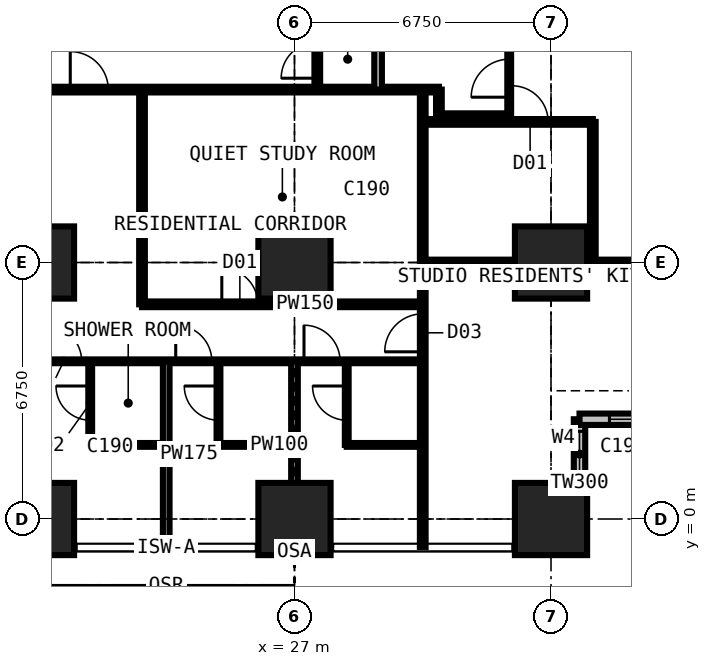
"""IFC4 building model, lengths in metres.
Left out: names, types, materials, properties, quantities, classifications, styles, units other than length and angle.
Written with IfcOpenShell. Run it as: python <this file> out.ifc"""

import sys

from ifc_helpers import new_model, si_unit, direction, frame, frame_2d, origin, origin_2d, place, context, subcontext, project, spatial, rectangle, extrude, element, fill, save


model = new_model("IFC4")
c1 = context("Model", 3, precision=1e-05, world=origin(), true_north=direction((0.0, 1.0)))
c2 = subcontext(c1, "Body", "Model", "MODEL_VIEW")
j1 = project(units=[si_unit("LENGTHUNIT", "METRE"), si_unit("PLANEANGLEUNIT", "RADIAN")], contexts=[c1])
p1 = place(None, origin())
s1 = spatial("IfcSite", under=j1, at=p1, CompositionType="ELEMENT")
p2 = place(p1, origin())
s2 = spatial("IfcBuilding", under=s1, at=p2, CompositionType="ELEMENT")
p3 = place(p2, frame((0.0, 0.0, 39.6)))
s3 = spatial("IfcBuildingStorey", under=s2, at=p3, CompositionType="ELEMENT", Elevation=39.6)
for number, where, z_axis, x_axis in (
    (1, (20.25, 0.0, 0.0), (0.0, 0.0, 1.0), (1.0, 0.0, 0.0)),
    (2, (20.25, 6.75, 0.0), (0.0, 0.0, 1.0), (1.0, 0.0, 0.0)),
    (3, (27.0, 0.0, 0.0), (0.0, 0.0, 1.0), (1.0, 0.0, 0.0)),
    (4, (27.0, 6.75, 0.0), (0.0, 0.0, 1.0), (1.0, 0.0, 0.0)),
    (5, (33.75, 0.0, 0.0), (0.0, 0.0, 1.0), (1.0, 0.0, 0.0)),
    (6, (33.75, 6.75, 0.0), (0.0, 0.0, 1.0), (1.0, 0.0, 0.0)),
):
    element("IfcColumn", number, at=place(p3, frame(where, z_axis=z_axis, x_axis=x_axis)), inside=s3, PredefinedType="COLUMN", context=c2, shape_type="SweptSolid", body=[
        extrude(rectangle(XDim=1.9, YDim=1.9, at=origin_2d()), origin(), (0.0, 0.0, 1.0), 3.6),
    ])
p4 = place(p3, frame((34.5, -0.75, 0.0), z_axis=(0.0, 0.0, 1.0), x_axis=(0.0, 1.0, 0.0)))
e7 = element("IfcWall", 7, at=p4, inside=s3, PredefinedType="SOLIDWALL", context=c2, shape_type="SweptSolid", body=[
    extrude(rectangle(XDim=3.375, YDim=0.3, at=frame_2d((1.688, 0.0))), origin(), (0.0, 0.0, 1.0), 3.375),
])
p5 = place(p4, frame((1.857, 0.0, 0.9)))
e8 = element("IfcOpeningElement", 8, at=p5, cuts=e7, PredefinedType="OPENING", context=c2, shape_type="SweptSolid", body=[
    extrude(rectangle(XDim=1.2, YDim=1.8, at=frame_2d((0.6, 0.9))), frame((0.0, 0.16, 0.0), z_axis=(0.0, -1.0, 0.0), x_axis=(1.0, 0.0, 0.0)), (0.0, 0.0, 1.0), 0.32),
])
p6 = place(p3, frame((34.5, 2.625, 0.0), z_axis=(0.0, 0.0, 1.0), x_axis=(1.0, 0.0, 0.0)))
e9 = element("IfcWall", 9, at=p6, inside=s3, PredefinedType="SOLIDWALL", context=c2, shape_type="SweptSolid", body=[
    extrude(rectangle(XDim=3.375, YDim=0.3, at=frame_2d((1.688, 0.0))), origin(), (0.0, 0.0, 1.0), 3.375),
])
p7 = place(p6, frame((0.788, 0.0, 0.6)))
e10 = element("IfcOpeningElement", 10, at=p7, cuts=e9, PredefinedType="OPENING", context=c2, shape_type="SweptSolid", body=[
    extrude(rectangle(XDim=1.8, YDim=2.1, at=frame_2d((0.9, 1.05))), frame((0.0, 0.16, 0.0), z_axis=(0.0, -1.0, 0.0), x_axis=(1.0, 0.0, 0.0)), (0.0, 0.0, 1.0), 0.32),
])
p8 = place(p3, frame((6.75, 4.15, 0.0), z_axis=(0.0, 0.0, 1.0), x_axis=(1.0, 0.0, 0.0)))
e11 = element("IfcWall", 11, at=p8, inside=s3, PredefinedType="PARTITIONING", context=c2, shape_type="SweptSolid", body=[
    extrude(rectangle(XDim=23.625, YDim=0.1, at=frame_2d((11.812, 0.0))), origin(), (0.0, 0.0, 1.0), 3.375),
])
p9 = place(p8, frame((1.2, 0.0, 0.0)))
e12 = element("IfcOpeningElement", 12, at=p9, cuts=e11, PredefinedType="OPENING", context=c2, shape_type="SweptSolid", body=[
    extrude(rectangle(XDim=1.0, YDim=2.2, at=frame_2d((0.5, 1.1))), frame((0.0, 0.06, 0.0), z_axis=(0.0, -1.0, 0.0), x_axis=(1.0, 0.0, 0.0)), (0.0, 0.0, 1.0), 0.12),
])
p10 = place(p8, frame((3.575, 0.0, 0.0)))
e13 = element("IfcOpeningElement", 13, at=p10, cuts=e11, PredefinedType="OPENING", context=c2, shape_type="SweptSolid", body=[
    extrude(rectangle(XDim=0.95, YDim=2.2, at=frame_2d((0.475, 1.1))), frame((0.0, 0.06, 0.0), z_axis=(0.0, -1.0, 0.0), x_axis=(1.0, 0.0, 0.0)), (0.0, 0.0, 1.0), 0.12),
])
p11 = place(p8, frame((7.0, 0.0, 0.0)))
e14 = element("IfcOpeningElement", 14, at=p11, cuts=e11, PredefinedType="OPENING", context=c2, shape_type="SweptSolid", body=[
    extrude(rectangle(XDim=0.95, YDim=2.2, at=frame_2d((0.475, 1.1))), frame((0.0, 0.06, 0.0), z_axis=(0.0, -1.0, 0.0), x_axis=(1.0, 0.0, 0.0)), (0.0, 0.0, 1.0), 0.12),
])
p12 = place(p8, frame((10.375, 0.0, 0.0)))
e15 = element("IfcOpeningElement", 15, at=p12, cuts=e11, PredefinedType="OPENING", context=c2, shape_type="SweptSolid", body=[
    extrude(rectangle(XDim=0.95, YDim=2.2, at=frame_2d((0.475, 1.1))), frame((0.0, 0.06, 0.0), z_axis=(0.0, -1.0, 0.0), x_axis=(1.0, 0.0, 0.0)), (0.0, 0.0, 1.0), 0.12),
])
p13 = place(p8, frame((13.7, 0.0, 0.0)))
e16 = element("IfcOpeningElement", 16, at=p13, cuts=e11, PredefinedType="OPENING", context=c2, shape_type="SweptSolid", body=[
    extrude(rectangle(XDim=0.95, YDim=2.2, at=frame_2d((0.475, 1.1))), frame((0.0, 0.06, 0.0), z_axis=(0.0, -1.0, 0.0), x_axis=(1.0, 0.0, 0.0)), (0.0, 0.0, 1.0), 0.12),
])
p14 = place(p8, frame((17.125, 0.0, 0.0)))
e17 = element("IfcOpeningElement", 17, at=p14, cuts=e11, PredefinedType="OPENING", context=c2, shape_type="SweptSolid", body=[
    extrude(rectangle(XDim=0.95, YDim=2.2, at=frame_2d((0.475, 1.1))), frame((0.0, 0.06, 0.0), z_axis=(0.0, -1.0, 0.0), x_axis=(1.0, 0.0, 0.0)), (0.0, 0.0, 1.0), 0.12),
])
p15 = place(p8, frame((20.5, 0.0, 0.0)))
e18 = element("IfcOpeningElement", 18, at=p15, cuts=e11, PredefinedType="OPENING", context=c2, shape_type="SweptSolid", body=[
    extrude(rectangle(XDim=0.95, YDim=2.2, at=frame_2d((0.475, 1.1))), frame((0.0, 0.06, 0.0), z_axis=(0.0, -1.0, 0.0), x_axis=(1.0, 0.0, 0.0)), (0.0, 0.0, 1.0), 0.12),
])
p16 = place(p3, frame((10.125, 11.3, 0.0), z_axis=(0.0, 0.0, 1.0), x_axis=(1.0, 0.0, 0.0)))
e19 = element("IfcWall", 19, at=p16, inside=s3, PredefinedType="PARTITIONING", context=c2, shape_type="SweptSolid", body=[
    extrude(rectangle(XDim=20.675, YDim=0.15, at=frame_2d((10.337, 0.0))), origin(), (0.0, 0.0, 1.0), 3.375),
])
p17 = place(p16, frame((8.375, 0.0, 0.0)))
e20 = element("IfcOpeningElement", 20, at=p17, cuts=e19, PredefinedType="OPENING", context=c2, shape_type="SweptSolid", body=[
    extrude(rectangle(XDim=1.0, YDim=2.2, at=frame_2d((0.5, 1.1))), frame((0.0, 0.085, 0.0), z_axis=(0.0, -1.0, 0.0), x_axis=(1.0, 0.0, 0.0)), (0.0, 0.0, 1.0), 0.17),
])
p18 = place(p16, frame((10.975, 0.0, 0.0)))
e21 = element("IfcOpeningElement", 21, at=p18, cuts=e19, PredefinedType="OPENING", context=c2, shape_type="SweptSolid", body=[
    extrude(rectangle(XDim=1.0, YDim=2.2, at=frame_2d((0.5, 1.1))), frame((0.0, 0.085, 0.0), z_axis=(0.0, -1.0, 0.0), x_axis=(1.0, 0.0, 0.0)), (0.0, 0.0, 1.0), 0.17),
])
p19 = place(p16, frame((3.925, 0.0, 0.0)))
e22 = element("IfcOpeningElement", 22, at=p19, cuts=e19, PredefinedType="OPENING", context=c2, shape_type="SweptSolid", body=[
    extrude(rectangle(XDim=0.95, YDim=2.2, at=frame_2d((0.475, 1.1))), frame((0.0, 0.085, 0.0), z_axis=(0.0, -1.0, 0.0), x_axis=(1.0, 0.0, 0.0)), (0.0, 0.0, 1.0), 0.17),
])
p20 = place(p3, frame((21.625, 1.95, 0.0), z_axis=(0.0, 0.0, 1.0), x_axis=(0.0, 1.0, 0.0)))
e23 = element("IfcWall", 23, at=p20, inside=s3, PredefinedType="PARTITIONING", context=c2, shape_type="SweptSolid", body=[
    extrude(rectangle(XDim=2.2, YDim=0.1, at=frame_2d((1.1, 0.0))), origin(), (0.0, 0.0, 1.0), 3.375),
])
p21 = place(p20, frame((0.65, 0.0, 0.0)))
e24 = element("IfcOpeningElement", 24, at=p21, cuts=e23, PredefinedType="OPENING", context=c2, shape_type="SweptSolid", body=[
    extrude(rectangle(XDim=0.9, YDim=2.2, at=frame_2d((0.45, 1.1))), frame((0.0, 0.06, 0.0), z_axis=(0.0, -1.0, 0.0), x_axis=(1.0, 0.0, 0.0)), (0.0, 0.0, 1.0), 0.12),
])
p22 = place(p3, frame((21.625, 1.95, 0.0), z_axis=(0.0, 0.0, 1.0), x_axis=(1.0, 0.0, 0.0)))
e25 = element("IfcWall", 25, at=p22, inside=s3, PredefinedType="PARTITIONING", context=c2, shape_type="SweptSolid", body=[
    extrude(rectangle(XDim=2.0, YDim=0.1, at=frame_2d((1.0, 0.0))), origin(), (0.0, 0.0, 1.0), 3.375),
])
p23 = place(p3, frame((22.988, 5.65, 0.0), z_axis=(0.0, 0.0, 1.0), x_axis=(1.0, 0.0, 0.0)))
e26 = element("IfcWall", 26, at=p23, inside=s3, PredefinedType="PARTITIONING", context=c2, shape_type="SweptSolid", body=[
    extrude(rectangle(XDim=7.387, YDim=0.15, at=frame_2d((3.694, 0.0))), origin(), (0.0, 0.0, 1.0), 3.375),
])
p24 = place(p23, frame((2.1, 0.0, 0.0)))
e27 = element("IfcOpeningElement", 27, at=p24, cuts=e26, PredefinedType="OPENING", context=c2, shape_type="SweptSolid", body=[
    extrude(rectangle(XDim=0.95, YDim=2.2, at=frame_2d((0.475, 1.1))), frame((0.0, 0.085, 0.0), z_axis=(0.0, -1.0, 0.0), x_axis=(1.0, 0.0, 0.0)), (0.0, 0.0, 1.0), 0.17),
])
p25 = place(p3, frame((22.988, 5.65, 0.0), z_axis=(0.0, 0.0, 1.0), x_axis=(0.0, 1.0, 0.0)))
e28 = element("IfcWall", 28, at=p25, inside=s3, PredefinedType="PARTITIONING", context=c2, shape_type="SweptSolid", body=[
    extrude(rectangle(XDim=5.65, YDim=0.15, at=frame_2d((2.825, 0.0))), origin(), (0.0, 0.0, 1.0), 3.375),
])
p26 = place(p3, frame((23.625, -0.734, 0.0), z_axis=(0.0, 0.0, 1.0), x_axis=(0.0, 1.0, 0.0)))
e29 = element("IfcWall", 29, at=p26, inside=s3, PredefinedType="PARTITIONING", context=c2, shape_type="SweptSolid", body=[
    extrude(rectangle(XDim=4.884, YDim=0.175, at=frame_2d((2.442, 0.0))), origin(), (0.0, 0.0, 1.0), 3.375),
])
p27 = place(p3, frame((25.0, 1.95, 0.0), z_axis=(0.0, 0.0, 1.0), x_axis=(0.0, 1.0, 0.0)))
e30 = element("IfcWall", 30, at=p27, inside=s3, PredefinedType="PARTITIONING", context=c2, shape_type="SweptSolid", body=[
    extrude(rectangle(XDim=2.2, YDim=0.1, at=frame_2d((1.1, 0.0))), origin(), (0.0, 0.0, 1.0), 3.375),
])
p28 = place(p27, frame((0.65, 0.0, 0.0)))
e31 = element("IfcOpeningElement", 31, at=p28, cuts=e30, PredefinedType="OPENING", context=c2, shape_type="SweptSolid", body=[
    extrude(rectangle(XDim=0.9, YDim=2.2, at=frame_2d((0.45, 1.1))), frame((0.0, 0.06, 0.0), z_axis=(0.0, -1.0, 0.0), x_axis=(1.0, 0.0, 0.0)), (0.0, 0.0, 1.0), 0.12),
])
p29 = place(p3, frame((25.0, 1.95, 0.0), z_axis=(0.0, 0.0, 1.0), x_axis=(1.0, 0.0, 0.0)))
e32 = element("IfcWall", 32, at=p29, inside=s3, PredefinedType="PARTITIONING", context=c2, shape_type="SweptSolid", body=[
    extrude(rectangle(XDim=2.0, YDim=0.1, at=frame_2d((1.0, 0.0))), origin(), (0.0, 0.0, 1.0), 3.375),
])
p30 = place(p3, frame((27.0, -0.734, 0.0), z_axis=(0.0, 0.0, 1.0), x_axis=(0.0, 1.0, 0.0)))
e33 = element("IfcWall", 33, at=p30, inside=s3, PredefinedType="PARTITIONING", context=c2, shape_type="SweptSolid", body=[
    extrude(rectangle(XDim=4.884, YDim=0.175, at=frame_2d((2.442, 0.0))), origin(), (0.0, 0.0, 1.0), 2.61),
])
p31 = place(p3, frame((27.6, 11.3, 0.0), z_axis=(0.0, 0.0, 1.0), x_axis=(0.0, 1.0, 0.0)))
e34 = element("IfcWall", 34, at=p31, inside=s3, PredefinedType="PARTITIONING", context=c2, shape_type="SweptSolid", body=[
    extrude(rectangle(XDim=1.6, YDim=0.15, at=frame_2d((0.8, 0.0))), origin(), (0.0, 0.0, 1.0), 3.375),
])
p32 = place(p31, frame((0.3, 0.0, 0.0)))
e35 = element("IfcOpeningElement", 35, at=p32, cuts=e34, PredefinedType="OPENING", context=c2, shape_type="SweptSolid", body=[
    extrude(rectangle(XDim=0.95, YDim=2.2, at=frame_2d((0.475, 1.1))), frame((0.0, 0.085, 0.0), z_axis=(0.0, -1.0, 0.0), x_axis=(1.0, 0.0, 0.0)), (0.0, 0.0, 1.0), 0.17),
])
p33 = place(p3, frame((28.375, 1.95, 0.0), z_axis=(0.0, 0.0, 1.0), x_axis=(0.0, 1.0, 0.0)))
e36 = element("IfcWall", 36, at=p33, inside=s3, PredefinedType="PARTITIONING", context=c2, shape_type="SweptSolid", body=[
    extrude(rectangle(XDim=2.2, YDim=0.1, at=frame_2d((1.1, 0.0))), origin(), (0.0, 0.0, 1.0), 3.375),
])
p34 = place(p33, frame((0.65, 0.0, 0.0)))
e37 = element("IfcOpeningElement", 37, at=p34, cuts=e36, PredefinedType="OPENING", context=c2, shape_type="SweptSolid", body=[
    extrude(rectangle(XDim=0.9, YDim=2.2, at=frame_2d((0.45, 1.1))), frame((0.0, 0.06, 0.0), z_axis=(0.0, -1.0, 0.0), x_axis=(1.0, 0.0, 0.0)), (0.0, 0.0, 1.0), 0.12),
])
p35 = place(p3, frame((28.375, 1.95, 0.0), z_axis=(0.0, 0.0, 1.0), x_axis=(1.0, 0.0, 0.0)))
e38 = element("IfcWall", 38, at=p35, inside=s3, PredefinedType="PARTITIONING", context=c2, shape_type="SweptSolid", body=[
    extrude(rectangle(XDim=2.0, YDim=0.1, at=frame_2d((1.0, 0.0))), origin(), (0.0, 0.0, 1.0), 3.375),
])
p36 = place(p3, frame((29.2, 11.3, 0.0), z_axis=(0.0, 0.0, 1.0), x_axis=(0.0, 1.0, 0.0)))
e39 = element("IfcWall", 39, at=p36, inside=s3, PredefinedType="PARTITIONING", context=c2, shape_type="SweptSolid", body=[
    extrude(rectangle(XDim=17.9, YDim=0.2, at=frame_2d((8.95, 0.0))), origin(), (0.0, 0.0, 1.0), 3.375),
])
p37 = place(p36, frame((8.35, 0.0, 0.0)))
e40 = element("IfcOpeningElement", 40, at=p37, cuts=e39, PredefinedType="OPENING", context=c2, shape_type="SweptSolid", body=[
    extrude(rectangle(XDim=1.2, YDim=2.2, at=frame_2d((0.6, 1.1))), frame((0.0, 0.11, 0.0), z_axis=(0.0, -1.0, 0.0), x_axis=(1.0, 0.0, 0.0)), (0.0, 0.0, 1.0), 0.22),
])
p38 = place(p3, frame((30.375, -0.734, 0.0), z_axis=(0.0, 0.0, 1.0), x_axis=(0.0, 1.0, 0.0)))
e41 = element("IfcWall", 41, at=p38, inside=s3, PredefinedType="PARTITIONING", context=c2, shape_type="SweptSolid", body=[
    extrude(rectangle(XDim=12.034, YDim=0.15, at=frame_2d((6.017, 0.0))), origin(), (0.0, 0.0, 1.0), 3.375),
])
p39 = place(p38, frame((5.134, 0.0, 0.0)))
e42 = element("IfcOpeningElement", 42, at=p39, cuts=e41, PredefinedType="OPENING", context=c2, shape_type="SweptSolid", body=[
    extrude(rectangle(XDim=1.0, YDim=2.2, at=frame_2d((0.5, 1.1))), frame((0.0, 0.085, 0.0), z_axis=(0.0, -1.0, 0.0), x_axis=(1.0, 0.0, 0.0)), (0.0, 0.0, 1.0), 0.17),
])
p40 = place(p3, frame((30.375, 6.75, 0.0), z_axis=(0.0, 0.0, 1.0), x_axis=(1.0, 0.0, 0.0)))
e43 = element("IfcWall", 43, at=p40, inside=s3, PredefinedType="PARTITIONING", context=c2, shape_type="SweptSolid", body=[
    extrude(rectangle(XDim=5.975, YDim=0.15, at=frame_2d((2.988, 0.0))), origin(), (0.0, 0.0, 1.0), 2.877),
])
p41 = place(p3, frame((30.375, 10.45, 0.0), z_axis=(0.0, 0.0, 1.0), x_axis=(1.0, 0.0, 0.0)))
e44 = element("IfcWall", 44, at=p41, inside=s3, PredefinedType="PARTITIONING", context=c2, shape_type="SweptSolid", body=[
    extrude(rectangle(XDim=4.475, YDim=0.15, at=frame_2d((2.238, 0.0))), origin(), (0.0, 0.0, 1.0), 3.375),
])
p42 = place(p41, frame((2.35, 0.0, 0.0)))
e45 = element("IfcOpeningElement", 45, at=p42, cuts=e44, PredefinedType="OPENING", context=c2, shape_type="SweptSolid", body=[
    extrude(rectangle(XDim=0.95, YDim=2.2, at=frame_2d((0.475, 1.1))), frame((0.0, 0.085, 0.0), z_axis=(0.0, -1.0, 0.0), x_axis=(1.0, 0.0, 0.0)), (0.0, 0.0, 1.0), 0.17),
])
p43 = place(p3, frame((30.8, 10.6, 0.0), z_axis=(0.0, 0.0, 1.0), x_axis=(0.0, 1.0, 0.0)))
e46 = element("IfcWall", 46, at=p43, inside=s3, PredefinedType="PARTITIONING", context=c2, shape_type="SweptSolid", body=[
    extrude(rectangle(XDim=0.7, YDim=0.15, at=frame_2d((0.35, 0.0))), origin(), (0.0, 0.0, 1.0), 3.375),
])
p44 = place(p3, frame((30.8, 10.6, 0.0), z_axis=(0.0, 0.0, 1.0), x_axis=(1.0, 0.0, 0.0)))
e47 = element("IfcWall", 47, at=p44, inside=s3, PredefinedType="PARTITIONING", context=c2, shape_type="SweptSolid", body=[
    extrude(rectangle(XDim=1.85, YDim=0.15, at=frame_2d((0.925, 0.0))), origin(), (0.0, 0.0, 1.0), 3.375),
])
p45 = place(p3, frame((32.65, 10.6, 0.0), z_axis=(0.0, 0.0, 1.0), x_axis=(0.0, 1.0, 0.0)))
e48 = element("IfcWall", 48, at=p45, inside=s3, PredefinedType="SHEAR", context=c2, shape_type="SweptSolid", body=[
    extrude(rectangle(XDim=9.3, YDim=0.1, at=frame_2d((4.65, 0.0))), origin(), (0.0, 0.0, 1.0), 3.375),
])
p46 = place(p45, frame((0.5, 0.0, 0.0)))
e49 = element("IfcOpeningElement", 49, at=p46, cuts=e48, PredefinedType="OPENING", context=c2, shape_type="SweptSolid", body=[
    extrude(rectangle(XDim=1.0, YDim=2.2, at=frame_2d((0.5, 1.1))), frame((0.0, 0.06, 0.0), z_axis=(0.0, -1.0, 0.0), x_axis=(1.0, 0.0, 0.0)), (0.0, 0.0, 1.0), 0.12),
])
p47 = place(p3, frame((34.85, 6.75, 0.0), z_axis=(0.0, 0.0, 1.0), x_axis=(0.0, 1.0, 0.0)))
e50 = element("IfcWall", 50, at=p47, inside=s3, PredefinedType="PARTITIONING", context=c2, shape_type="SweptSolid", body=[
    extrude(rectangle(XDim=3.7, YDim=0.15, at=frame_2d((1.85, 0.0))), origin(), (0.0, 0.0, 1.0), 3.375),
])
p48 = place(p5, origin())
e51 = element("IfcWindow", 51, at=p48, inside=s3, PartitioningType="SINGLE_PANEL", PredefinedType="WINDOW", context=c2, shape_type="SweptSolid", body=[
    extrude(rectangle(XDim=1.2, YDim=1.8, at=frame_2d((0.6, 0.9))), frame((0.0, 0.03, 0.0), z_axis=(0.0, -1.0, 0.0), x_axis=(1.0, 0.0, 0.0)), (0.0, 0.0, 1.0), 0.06),
])
fill(e8, e51)
p49 = place(p7, origin())
e52 = element("IfcWindow", 52, at=p49, inside=s3, PartitioningType="SINGLE_PANEL", PredefinedType="WINDOW", context=c2, shape_type="SweptSolid", body=[
    extrude(rectangle(XDim=1.8, YDim=2.1, at=frame_2d((0.9, 1.05))), frame((0.0, 0.03, 0.0), z_axis=(0.0, -1.0, 0.0), x_axis=(1.0, 0.0, 0.0)), (0.0, 0.0, 1.0), 0.06),
])
fill(e10, e52)
p50 = place(p32, origin())
e53 = element("IfcDoor", 53, at=p50, inside=s3, OperationType="SINGLE_SWING_LEFT", PredefinedType="DOOR", context=c2, shape_type="SweptSolid", body=[
    extrude(rectangle(XDim=0.95, YDim=2.2, at=frame_2d((0.475, 1.1))), frame((0.0, 0.025, 0.0), z_axis=(0.0, -1.0, 0.0), x_axis=(1.0, 0.0, 0.0)), (0.0, 0.0, 1.0), 0.05),
])
fill(e35, e53)
p51 = place(p13, origin())
e54 = element("IfcDoor", 54, at=p51, inside=s3, OperationType="SINGLE_SWING_LEFT", PredefinedType="DOOR", context=c2, shape_type="SweptSolid", body=[
    extrude(rectangle(XDim=0.95, YDim=2.2, at=frame_2d((0.475, 1.1))), frame((0.0, 0.025, 0.0), z_axis=(0.0, -1.0, 0.0), x_axis=(1.0, 0.0, 0.0)), (0.0, 0.0, 1.0), 0.05),
])
fill(e16, e54)
p52 = place(p21, origin())
e55 = element("IfcDoor", 55, at=p52, inside=s3, OperationType="SINGLE_SWING_RIGHT", PredefinedType="DOOR", context=c2, shape_type="SweptSolid", body=[
    extrude(rectangle(XDim=0.9, YDim=2.2, at=frame_2d((0.45, 1.1))), frame((0.0, 0.025, 0.0), z_axis=(0.0, -1.0, 0.0), x_axis=(1.0, 0.0, 0.0)), (0.0, 0.0, 1.0), 0.05),
])
fill(e24, e55)
p53 = place(p14, origin())
e56 = element("IfcDoor", 56, at=p53, inside=s3, OperationType="SINGLE_SWING_LEFT", PredefinedType="DOOR", context=c2, shape_type="SweptSolid", body=[
    extrude(rectangle(XDim=0.95, YDim=2.2, at=frame_2d((0.475, 1.1))), frame((0.0, 0.025, 0.0), z_axis=(0.0, -1.0, 0.0), x_axis=(1.0, 0.0, 0.0)), (0.0, 0.0, 1.0), 0.05),
])
fill(e17, e56)
p54 = place(p28, origin())
e57 = element("IfcDoor", 57, at=p54, inside=s3, OperationType="SINGLE_SWING_RIGHT", PredefinedType="DOOR", context=c2, shape_type="SweptSolid", body=[
    extrude(rectangle(XDim=0.9, YDim=2.2, at=frame_2d((0.45, 1.1))), frame((0.0, 0.025, 0.0), z_axis=(0.0, -1.0, 0.0), x_axis=(1.0, 0.0, 0.0)), (0.0, 0.0, 1.0), 0.05),
])
fill(e31, e57)
p55 = place(p15, origin())
e58 = element("IfcDoor", 58, at=p55, inside=s3, OperationType="SINGLE_SWING_LEFT", PredefinedType="DOOR", context=c2, shape_type="SweptSolid", body=[
    extrude(rectangle(XDim=0.95, YDim=2.2, at=frame_2d((0.475, 1.1))), frame((0.0, 0.025, 0.0), z_axis=(0.0, -1.0, 0.0), x_axis=(1.0, 0.0, 0.0)), (0.0, 0.0, 1.0), 0.05),
])
fill(e18, e58)
p56 = place(p34, origin())
e59 = element("IfcDoor", 59, at=p56, inside=s3, OperationType="SINGLE_SWING_RIGHT", PredefinedType="DOOR", context=c2, shape_type="SweptSolid", body=[
    extrude(rectangle(XDim=0.9, YDim=2.2, at=frame_2d((0.45, 1.1))), frame((0.0, 0.025, 0.0), z_axis=(0.0, -1.0, 0.0), x_axis=(1.0, 0.0, 0.0)), (0.0, 0.0, 1.0), 0.05),
])
fill(e37, e59)
p57 = place(p18, origin())
e60 = element("IfcDoor", 60, at=p57, inside=s3, OperationType="SINGLE_SWING_LEFT", PredefinedType="DOOR", context=c2, shape_type="SweptSolid", body=[
    extrude(rectangle(XDim=1.0, YDim=2.2, at=frame_2d((0.5, 1.1))), frame((0.0, 0.025, 0.0), z_axis=(0.0, -1.0, 0.0), x_axis=(1.0, 0.0, 0.0)), (0.0, 0.0, 1.0), 0.05),
])
fill(e21, e60)
p58 = place(p24, origin())
e61 = element("IfcDoor", 61, at=p58, inside=s3, OperationType="SINGLE_SWING_LEFT", PredefinedType="DOOR", context=c2, shape_type="SweptSolid", body=[
    extrude(rectangle(XDim=0.95, YDim=2.2, at=frame_2d((0.475, 1.1))), frame((0.0, 0.025, 0.0), z_axis=(0.0, -1.0, 0.0), x_axis=(1.0, 0.0, 0.0)), (0.0, 0.0, 1.0), 0.05),
])
fill(e27, e61)
p59 = place(p39, origin())
e62 = element("IfcDoor", 62, at=p59, inside=s3, OperationType="SINGLE_SWING_LEFT", PredefinedType="DOOR", context=c2, shape_type="SweptSolid", body=[
    extrude(rectangle(XDim=1.0, YDim=2.2, at=frame_2d((0.5, 1.1))), frame((0.0, 0.025, 0.0), z_axis=(0.0, -1.0, 0.0), x_axis=(1.0, 0.0, 0.0)), (0.0, 0.0, 1.0), 0.05),
])
fill(e42, e62)
p60 = place(p46, origin())
e63 = element("IfcDoor", 63, at=p60, inside=s3, OperationType="SINGLE_SWING_LEFT", PredefinedType="DOOR", context=c2, shape_type="SweptSolid", body=[
    extrude(rectangle(XDim=1.0, YDim=2.2, at=frame_2d((0.5, 1.1))), frame((0.0, 0.025, 0.0), z_axis=(0.0, -1.0, 0.0), x_axis=(1.0, 0.0, 0.0)), (0.0, 0.0, 1.0), 0.05),
])
fill(e49, e63)
p61 = place(p42, origin())
e64 = element("IfcDoor", 64, at=p61, inside=s3, OperationType="SINGLE_SWING_LEFT", PredefinedType="DOOR", context=c2, shape_type="SweptSolid", body=[
    extrude(rectangle(XDim=0.95, YDim=2.2, at=frame_2d((0.475, 1.1))), frame((0.0, 0.025, 0.0), z_axis=(0.0, -1.0, 0.0), x_axis=(1.0, 0.0, 0.0)), (0.0, 0.0, 1.0), 0.05),
])
fill(e45, e64)
save(model, sys.argv[1])
